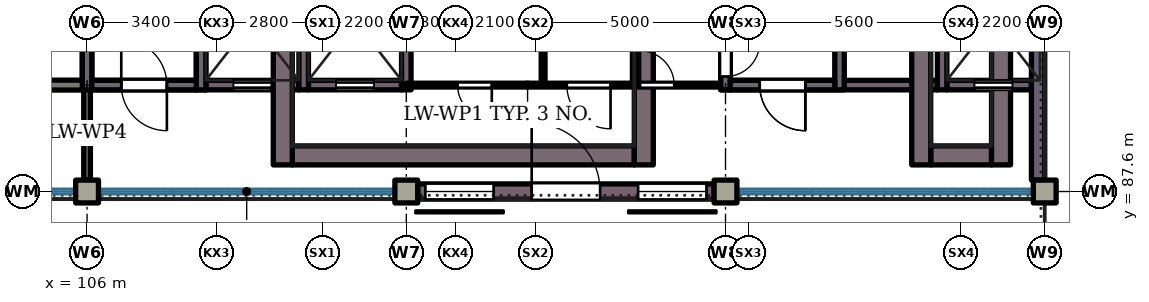
"""IFC4 building model, lengths in metres.
Left out: names, types, materials, properties, quantities, classifications, styles, units other than length and angle.
Written with IfcOpenShell. Run it as: python <this file> out.ifc"""

import sys

from ifc_helpers import new_model, si_unit, direction, frame, frame_2d, origin, origin_2d, place, context, subcontext, project, spatial, rectangle, extrude, element, fill, save


model = new_model("IFC4")
c1 = context("Model", 3, precision=1e-05, world=origin(), true_north=direction((0.0, 1.0)))
c2 = subcontext(c1, "Body", "Model", "MODEL_VIEW")
j1 = project(units=[si_unit("LENGTHUNIT", "METRE"), si_unit("PLANEANGLEUNIT", "RADIAN")], contexts=[c1])
p1 = place(None, origin())
s1 = spatial("IfcSite", under=j1, at=p1, CompositionType="ELEMENT")
p2 = place(p1, origin())
s2 = spatial("IfcBuilding", under=s1, at=p2, CompositionType="ELEMENT")
p3 = place(p2, frame((0.0, 0.0, 16.8)))
s3 = spatial("IfcBuildingStorey", under=s2, at=p3, CompositionType="ELEMENT", Elevation=16.8)
for number, where, z_axis, x_axis in (
    (1, (106.0, 87.6, 0.0), (0.0, 0.0, 1.0), (1.0, 0.0, 0.0)),
    (2, (114.4, 87.6, 0.0), (0.0, 0.0, 1.0), (1.0, 0.0, 0.0)),
    (3, (122.8, 87.6, 0.0), (0.0, 0.0, 1.0), (1.0, 0.0, 0.0)),
    (4, (131.2, 87.6, 0.0), (0.0, 0.0, 1.0), (1.0, 0.0, 0.0)),
):
    element("IfcColumn", number, at=place(p3, frame(where, z_axis=z_axis, x_axis=x_axis)), inside=s3, PredefinedType="COLUMN", context=c2, shape_type="SweptSolid", body=[
        extrude(rectangle(XDim=0.6, YDim=0.6, at=origin_2d()), origin(), (0.0, 0.0, 1.0), 4.2),
    ])
p4 = place(p3, frame((106.125, 90.4, 0.0), z_axis=(0.0, 0.0, 1.0), x_axis=(1.0, 0.0, 0.0)))
e5 = element("IfcWall", 5, at=p4, inside=s3, PredefinedType="SHEAR", context=c2, shape_type="SweptSolid", body=[
    extrude(rectangle(XDim=2.75, YDim=0.25, at=frame_2d((1.375, 0.0))), origin(), (0.0, 0.0, 1.0), 4.2),
])
p5 = place(p4, frame((0.775, 0.0, 0.0)))
e6 = element("IfcOpeningElement", 6, at=p5, cuts=e5, PredefinedType="OPENING", context=c2, shape_type="SweptSolid", body=[
    extrude(rectangle(XDim=1.2, YDim=2.1, at=frame_2d((0.6, 1.05))), frame((0.0, 0.135, 0.0), z_axis=(0.0, -1.0, 0.0), x_axis=(1.0, 0.0, 0.0)), (0.0, 0.0, 1.0), 0.27),
])
p6 = place(p3, frame((109.125, 90.4, 0.0), z_axis=(0.0, 0.0, 1.0), x_axis=(1.0, 0.0, 0.0)))
e7 = element("IfcWall", 7, at=p6, inside=s3, PredefinedType="SHEAR", context=c2, shape_type="SweptSolid", body=[
    extrude(rectangle(XDim=2.45, YDim=0.25, at=frame_2d((1.225, 0.0))), origin(), (0.0, 0.0, 1.0), 4.2),
])
p7 = place(p6, frame((0.725, 0.0, 0.0)))
e8 = element("IfcOpeningElement", 8, at=p7, cuts=e7, PredefinedType="OPENING", context=c2, shape_type="SweptSolid", body=[
    extrude(rectangle(XDim=1.0, YDim=2.1, at=frame_2d((0.5, 1.05))), frame((0.0, 0.135, 0.0), z_axis=(0.0, -1.0, 0.0), x_axis=(1.0, 0.0, 0.0)), (0.0, 0.0, 1.0), 0.27),
])
p8 = place(p3, frame((111.825, 90.4, 0.0), z_axis=(0.0, 0.0, 1.0), x_axis=(1.0, 0.0, 0.0)))
e9 = element("IfcWall", 9, at=p8, inside=s3, PredefinedType="SHEAR", context=c2, shape_type="SweptSolid", body=[
    extrude(rectangle(XDim=2.45, YDim=0.25, at=frame_2d((1.225, 0.0))), origin(), (0.0, 0.0, 1.0), 4.2),
])
p9 = place(p8, frame((0.725, 0.0, 0.0)))
e10 = element("IfcOpeningElement", 10, at=p9, cuts=e9, PredefinedType="OPENING", context=c2, shape_type="SweptSolid", body=[
    extrude(rectangle(XDim=1.0, YDim=2.1, at=frame_2d((0.5, 1.05))), frame((0.0, 0.135, 0.0), z_axis=(0.0, -1.0, 0.0), x_axis=(1.0, 0.0, 0.0)), (0.0, 0.0, 1.0), 0.27),
])
p10 = place(p3, frame((122.925, 90.4, 0.0), z_axis=(0.0, 0.0, 1.0), x_axis=(1.0, 0.0, 0.0)))
e11 = element("IfcWall", 11, at=p10, inside=s3, PredefinedType="SHEAR", context=c2, shape_type="SweptSolid", body=[
    extrude(rectangle(XDim=5.45, YDim=0.25, at=frame_2d((2.725, 0.0))), origin(), (0.0, 0.0, 1.0), 4.2),
])
p11 = place(p10, frame((0.775, 0.0, 0.0)))
e12 = element("IfcOpeningElement", 12, at=p11, cuts=e11, PredefinedType="OPENING", context=c2, shape_type="SweptSolid", body=[
    extrude(rectangle(XDim=1.2, YDim=2.1, at=frame_2d((0.6, 1.05))), frame((0.0, 0.135, 0.0), z_axis=(0.0, -1.0, 0.0), x_axis=(1.0, 0.0, 0.0)), (0.0, 0.0, 1.0), 0.27),
])
p12 = place(p3, frame((128.625, 90.4, 0.0), z_axis=(0.0, 0.0, 1.0), x_axis=(1.0, 0.0, 0.0)))
e13 = element("IfcWall", 13, at=p12, inside=s3, PredefinedType="SHEAR", context=c2, shape_type="SweptSolid", body=[
    extrude(rectangle(XDim=2.225, YDim=0.25, at=frame_2d((1.113, 0.0))), origin(), (0.0, 0.0, 1.0), 4.2),
])
p13 = place(p12, frame((0.725, 0.0, 0.0)))
e14 = element("IfcOpeningElement", 14, at=p13, cuts=e13, PredefinedType="OPENING", context=c2, shape_type="SweptSolid", body=[
    extrude(rectangle(XDim=1.0, YDim=2.1, at=frame_2d((0.5, 1.05))), frame((0.0, 0.135, 0.0), z_axis=(0.0, -1.0, 0.0), x_axis=(1.0, 0.0, 0.0)), (0.0, 0.0, 1.0), 0.27),
])
p14 = place(p3, frame((106.0, 90.275, 0.0), z_axis=(0.0, 0.0, 1.0), x_axis=(0.0, 1.0, 0.0)))
e15 = element("IfcWall", 15, at=p14, inside=s3, PredefinedType="SHEAR", context=c2, shape_type="SweptSolid", body=[
    extrude(rectangle(XDim=7.225, YDim=0.25, at=frame_2d((3.613, 0.0))), origin(), (0.0, 0.0, 1.0), 4.2),
])
for number, where, z_axis, x_axis in (
    (16, (109.0, 90.275, 0.0), (0.0, 0.0, 1.0), (0.0, 1.0, 0.0)),
    (17, (111.7, 90.275, 0.0), (0.0, 0.0, 1.0), (0.0, 1.0, 0.0)),
):
    element("IfcWall", number, at=place(p3, frame(where, z_axis=z_axis, x_axis=x_axis)), inside=s3, PredefinedType="SHEAR", context=c2, shape_type="SweptSolid", body=[
        extrude(rectangle(XDim=3.65, YDim=0.25, at=frame_2d((1.825, 0.0))), origin(), (0.0, 0.0, 1.0), 4.2),
    ])
p15 = place(p3, frame((114.4, 90.275, 0.0), z_axis=(0.0, 0.0, 1.0), x_axis=(0.0, 1.0, 0.0)))
e18 = element("IfcWall", 18, at=p15, inside=s3, PredefinedType="SHEAR", context=c2, shape_type="SweptSolid", body=[
    extrude(rectangle(XDim=7.225, YDim=0.25, at=frame_2d((3.613, 0.0))), origin(), (0.0, 0.0, 1.0), 4.2),
])
p16 = place(p15, frame((5.35, 0.0, 0.0)))
e19 = element("IfcOpeningElement", 19, at=p16, cuts=e18, PredefinedType="OPENING", context=c2, shape_type="SweptSolid", body=[
    extrude(rectangle(XDim=0.9, YDim=2.1, at=frame_2d((0.45, 1.05))), frame((0.0, 0.135, 0.0), z_axis=(0.0, -1.0, 0.0), x_axis=(1.0, 0.0, 0.0)), (0.0, 0.0, 1.0), 0.27),
])
p17 = place(p3, frame((122.8, 90.275, 0.0), z_axis=(0.0, 0.0, 1.0), x_axis=(0.0, 1.0, 0.0)))
e20 = element("IfcWall", 20, at=p17, inside=s3, PredefinedType="SHEAR", context=c2, shape_type="SweptSolid", body=[
    extrude(rectangle(XDim=7.225, YDim=0.25, at=frame_2d((3.613, 0.0))), origin(), (0.0, 0.0, 1.0), 4.2),
])
p18 = place(p17, frame((0.35, 0.0, 0.0)))
e21 = element("IfcOpeningElement", 21, at=p18, cuts=e20, PredefinedType="OPENING", context=c2, shape_type="SweptSolid", body=[
    extrude(rectangle(XDim=0.9, YDim=2.1, at=frame_2d((0.45, 1.05))), frame((0.0, 0.135, 0.0), z_axis=(0.0, -1.0, 0.0), x_axis=(1.0, 0.0, 0.0)), (0.0, 0.0, 1.0), 0.27),
])
p19 = place(p3, frame((128.5, 90.275, 0.0), z_axis=(0.0, 0.0, 1.0), x_axis=(0.0, 1.0, 0.0)))
e22 = element("IfcWall", 22, at=p19, inside=s3, PredefinedType="SHEAR", context=c2, shape_type="SweptSolid", body=[
    extrude(rectangle(XDim=3.65, YDim=0.25, at=frame_2d((1.825, 0.0))), origin(), (0.0, 0.0, 1.0), 4.2),
])
p20 = place(p3, frame((131.025, 97.5, 0.0), z_axis=(0.0, 0.0, 1.0), x_axis=(0.0, -1.0, 0.0)))
e23 = element("IfcWall", 23, at=p20, inside=s3, PredefinedType="SHEAR", context=c2, shape_type="SweptSolid", body=[
    extrude(rectangle(XDim=9.6, YDim=0.35, at=frame_2d((4.8, 0.0))), origin(), (0.0, 0.0, 1.0), 4.2),
])
p21 = place(p3, frame((114.7, 87.6, 0.0), z_axis=(0.0, 0.0, 1.0), x_axis=(1.0, 0.0, 0.0)))
e24 = element("IfcWall", 24, at=p21, inside=s3, PredefinedType="SOLIDWALL", context=c2, shape_type="SweptSolid", body=[
    extrude(rectangle(XDim=7.8, YDim=0.4, at=frame_2d((3.9, 0.0))), origin(), (0.0, 0.0, 1.0), 3.3),
])
p22 = place(p21, frame((3.0, 0.0, 0.0)))
e25 = element("IfcOpeningElement", 25, at=p22, cuts=e24, PredefinedType="OPENING", context=c2, shape_type="SweptSolid", body=[
    extrude(rectangle(XDim=1.8, YDim=2.4, at=frame_2d((0.9, 1.2))), frame((0.0, 0.21, 0.0), z_axis=(0.0, -1.0, 0.0), x_axis=(1.0, 0.0, 0.0)), (0.0, 0.0, 1.0), 0.42),
])
p23 = place(p21, frame((0.2, 0.0, 0.9)))
e26 = element("IfcOpeningElement", 26, at=p23, cuts=e24, PredefinedType="OPENING", context=c2, shape_type="SweptSolid", body=[
    extrude(rectangle(XDim=1.8, YDim=1.9, at=frame_2d((0.9, 0.95))), frame((0.0, 0.21, 0.0), z_axis=(0.0, -1.0, 0.0), x_axis=(1.0, 0.0, 0.0)), (0.0, 0.0, 1.0), 0.42),
])
p24 = place(p21, frame((5.8, 0.0, 0.9)))
e27 = element("IfcOpeningElement", 27, at=p24, cuts=e24, PredefinedType="OPENING", context=c2, shape_type="SweptSolid", body=[
    extrude(rectangle(XDim=1.8, YDim=1.9, at=frame_2d((0.9, 0.95))), frame((0.0, 0.21, 0.0), z_axis=(0.0, -1.0, 0.0), x_axis=(1.0, 0.0, 0.0)), (0.0, 0.0, 1.0), 0.42),
])
p25 = place(p3, frame((128.2, 88.55, 4.2), z_axis=(0.0, 0.0, 1.0), x_axis=(1.0, 0.0, 0.0)))
e28 = element("IfcWall", 28, at=p25, inside=s3, PredefinedType="SOLIDWALL", context=c2, shape_type="SweptSolid", body=[
    extrude(rectangle(XDim=1.6, YDim=0.5, at=frame_2d((0.8, 0.0))), origin(), (0.0, 0.0, 1.0), 0.9),
])
for number, where, z_axis, x_axis in (
    (29, (127.95, 88.3, 4.2), (0.0, 0.0, 1.0), (0.0, 1.0, 0.0)),
    (30, (130.05, 88.3, 4.2), (0.0, 0.0, 1.0), (0.0, 1.0, 0.0)),
):
    element("IfcWall", number, at=place(p3, frame(where, z_axis=z_axis, x_axis=x_axis)), inside=s3, PredefinedType="SOLIDWALL", context=c2, shape_type="SweptSolid", body=[
        extrude(rectangle(XDim=8.8, YDim=0.5, at=frame_2d((4.4, 0.0))), origin(), (0.0, 0.0, 1.0), 0.9),
    ])
p26 = place(p3, frame((111.4, 88.55, 4.2), z_axis=(0.0, 0.0, 1.0), x_axis=(1.0, 0.0, 0.0)))
e31 = element("IfcWall", 31, at=p26, inside=s3, PredefinedType="SOLIDWALL", context=c2, shape_type="SweptSolid", body=[
    extrude(rectangle(XDim=9.0, YDim=0.5, at=frame_2d((4.5, 0.0))), origin(), (0.0, 0.0, 1.0), 0.9),
])
for number, where, z_axis, x_axis in (
    (32, (111.15, 88.3, 4.2), (0.0, 0.0, 1.0), (0.0, 1.0, 0.0)),
    (33, (120.65, 88.3, 4.2), (0.0, 0.0, 1.0), (0.0, 1.0, 0.0)),
):
    element("IfcWall", number, at=place(p3, frame(where, z_axis=z_axis, x_axis=x_axis)), inside=s3, PredefinedType="SOLIDWALL", context=c2, shape_type="SweptSolid", body=[
        extrude(rectangle(XDim=8.8, YDim=0.5, at=frame_2d((4.4, 0.0))), origin(), (0.0, 0.0, 1.0), 0.9),
    ])
p27 = place(p3, frame((97.6, 90.4, 0.0), z_axis=(0.0, 0.0, 1.0), x_axis=(1.0, 0.0, 0.0)))
e34 = element("IfcWall", 34, at=p27, inside=s3, PredefinedType="PARTITIONING", context=c2, shape_type="SweptSolid", body=[
    extrude(rectangle(XDim=8.4, YDim=0.26, at=frame_2d((4.2, 0.0))), origin(), (0.0, 0.0, 1.0), 3.9),
])
p28 = place(p27, frame((3.45, 0.0, 0.0)))
e35 = element("IfcOpeningElement", 35, at=p28, cuts=e34, PredefinedType="OPENING", context=c2, shape_type="SweptSolid", body=[
    extrude(rectangle(XDim=1.5, YDim=2.1, at=frame_2d((0.75, 1.05))), frame((0.0, 0.14, 0.0), z_axis=(0.0, -1.0, 0.0), x_axis=(1.0, 0.0, 0.0)), (0.0, 0.0, 1.0), 0.28),
])
p29 = place(p3, frame((114.4, 90.4, 0.0), z_axis=(0.0, 0.0, 1.0), x_axis=(1.0, 0.0, 0.0)))
e36 = element("IfcWall", 36, at=p29, inside=s3, PredefinedType="PARTITIONING", context=c2, shape_type="SweptSolid", body=[
    extrude(rectangle(XDim=8.4, YDim=0.1, at=frame_2d((4.2, 0.0))), origin(), (0.0, 0.0, 1.0), 3.9),
])
p30 = place(p29, frame((1.35, 0.0, 0.0)))
e37 = element("IfcOpeningElement", 37, at=p30, cuts=e36, PredefinedType="OPENING", context=c2, shape_type="SweptSolid", body=[
    extrude(rectangle(XDim=0.9, YDim=2.1, at=frame_2d((0.45, 1.05))), frame((0.0, 0.06, 0.0), z_axis=(0.0, -1.0, 0.0), x_axis=(1.0, 0.0, 0.0)), (0.0, 0.0, 1.0), 0.12),
])
p31 = place(p29, frame((4.225, 0.0, 0.0)))
e38 = element("IfcOpeningElement", 38, at=p31, cuts=e36, PredefinedType="OPENING", context=c2, shape_type="SweptSolid", body=[
    extrude(rectangle(XDim=1.15, YDim=2.1, at=frame_2d((0.575, 1.05))), frame((0.0, 0.06, 0.0), z_axis=(0.0, -1.0, 0.0), x_axis=(1.0, 0.0, 0.0)), (0.0, 0.0, 1.0), 0.12),
])
p32 = place(p29, frame((6.15, 0.0, 0.0)))
e39 = element("IfcOpeningElement", 39, at=p32, cuts=e36, PredefinedType="OPENING", context=c2, shape_type="SweptSolid", body=[
    extrude(rectangle(XDim=0.9, YDim=2.1, at=frame_2d((0.45, 1.05))), frame((0.0, 0.06, 0.0), z_axis=(0.0, -1.0, 0.0), x_axis=(1.0, 0.0, 0.0)), (0.0, 0.0, 1.0), 0.12),
])
p33 = place(p3, frame((106.0, 87.9, 0.0), z_axis=(0.0, 0.0, 1.0), x_axis=(0.0, 1.0, 0.0)))
e40 = element("IfcWall", 40, at=p33, inside=s3, PredefinedType="PARTITIONING", context=c2, shape_type="SweptSolid", body=[
    extrude(rectangle(XDim=2.5, YDim=0.175, at=frame_2d((1.25, 0.0))), origin(), (0.0, 0.0, 1.0), 3.0),
])
for number, where, z_axis, x_axis in (
    (41, (118.0, 90.4, 0.0), (0.0, 0.0, 1.0), (0.0, 1.0, 0.0)),
    (42, (120.4, 90.4, 0.0), (0.0, 0.0, 1.0), (0.0, 1.0, 0.0)),
):
    element("IfcWall", number, at=place(p3, frame(where, z_axis=z_axis, x_axis=x_axis)), inside=s3, PredefinedType="PARTITIONING", context=c2, shape_type="SweptSolid", body=[
        extrude(rectangle(XDim=7.2, YDim=0.1, at=frame_2d((3.6, 0.0))), origin(), (0.0, 0.0, 1.0), 3.9),
    ])
for number, where, z_axis, x_axis in (
    (43, (106.0, 90.275, 4.2), (0.0, 0.0, 1.0), (0.0, 1.0, 0.0)),
    (44, (109.0, 90.275, 4.2), (0.0, 0.0, 1.0), (0.0, 1.0, 0.0)),
):
    element("IfcWall", number, at=place(p3, frame(where, z_axis=z_axis, x_axis=x_axis)), inside=s3, PredefinedType="SHEAR", context=c2, shape_type="SweptSolid", body=[
        extrude(rectangle(XDim=7.525, YDim=0.25, at=frame_2d((3.763, 0.0))), origin(), (0.0, 0.0, 1.0), 3.5),
    ])
p34 = place(p3, frame((106.125, 90.4, 4.2), z_axis=(0.0, 0.0, 1.0), x_axis=(1.0, 0.0, 0.0)))
e45 = element("IfcWall", 45, at=p34, inside=s3, PredefinedType="SHEAR", context=c2, shape_type="SweptSolid", body=[
    extrude(rectangle(XDim=2.75, YDim=0.25, at=frame_2d((1.375, 0.0))), origin(), (0.0, 0.0, 1.0), 3.5),
])
p35 = place(p34, frame((0.775, 0.0, 0.0)))
e46 = element("IfcOpeningElement", 46, at=p35, cuts=e45, PredefinedType="OPENING", context=c2, shape_type="SweptSolid", body=[
    extrude(rectangle(XDim=1.2, YDim=2.1, at=frame_2d((0.6, 1.05))), frame((0.0, 0.135, 0.0), z_axis=(0.0, -1.0, 0.0), x_axis=(1.0, 0.0, 0.0)), (0.0, 0.0, 1.0), 0.27),
])
for number, where, z_axis, x_axis in (
    (47, (122.8, 90.275, 4.2), (0.0, 0.0, 1.0), (0.0, 1.0, 0.0)),
    (48, (125.8, 90.275, 4.2), (0.0, 0.0, 1.0), (0.0, 1.0, 0.0)),
):
    element("IfcWall", number, at=place(p3, frame(where, z_axis=z_axis, x_axis=x_axis)), inside=s3, PredefinedType="SHEAR", context=c2, shape_type="SweptSolid", body=[
        extrude(rectangle(XDim=7.525, YDim=0.25, at=frame_2d((3.763, 0.0))), origin(), (0.0, 0.0, 1.0), 4.2),
    ])
p36 = place(p3, frame((122.925, 90.4, 4.2), z_axis=(0.0, 0.0, 1.0), x_axis=(1.0, 0.0, 0.0)))
e49 = element("IfcWall", 49, at=p36, inside=s3, PredefinedType="SHEAR", context=c2, shape_type="SweptSolid", body=[
    extrude(rectangle(XDim=2.75, YDim=0.25, at=frame_2d((1.375, 0.0))), origin(), (0.0, 0.0, 1.0), 4.2),
])
p37 = place(p36, frame((0.775, 0.0, 0.0)))
e50 = element("IfcOpeningElement", 50, at=p37, cuts=e49, PredefinedType="OPENING", context=c2, shape_type="SweptSolid", body=[
    extrude(rectangle(XDim=1.2, YDim=2.1, at=frame_2d((0.6, 1.05))), frame((0.0, 0.135, 0.0), z_axis=(0.0, -1.0, 0.0), x_axis=(1.0, 0.0, 0.0)), (0.0, 0.0, 1.0), 0.27),
])
p38 = place(p22, origin())
e51 = element("IfcDoor", 51, at=p38, inside=s3, OperationType="DOUBLE_DOOR_SINGLE_SWING", PredefinedType="DOOR", context=c2, shape_type="SweptSolid", body=[
    extrude(rectangle(XDim=1.8, YDim=2.4, at=frame_2d((0.9, 1.2))), frame((0.0, 0.025, 0.0), z_axis=(0.0, -1.0, 0.0), x_axis=(1.0, 0.0, 0.0)), (0.0, 0.0, 1.0), 0.05),
])
fill(e25, e51)
p39 = place(p23, origin())
e52 = element("IfcWindow", 52, at=p39, inside=s3, PartitioningType="SINGLE_PANEL", PredefinedType="WINDOW", context=c2, shape_type="SweptSolid", body=[
    extrude(rectangle(XDim=1.8, YDim=1.9, at=frame_2d((0.9, 0.95))), frame((0.0, 0.03, 0.0), z_axis=(0.0, -1.0, 0.0), x_axis=(1.0, 0.0, 0.0)), (0.0, 0.0, 1.0), 0.06),
])
fill(e26, e52)
p40 = place(p24, origin())
e53 = element("IfcWindow", 53, at=p40, inside=s3, PartitioningType="SINGLE_PANEL", PredefinedType="WINDOW", context=c2, shape_type="SweptSolid", body=[
    extrude(rectangle(XDim=1.8, YDim=1.9, at=frame_2d((0.9, 0.95))), frame((0.0, 0.03, 0.0), z_axis=(0.0, -1.0, 0.0), x_axis=(1.0, 0.0, 0.0)), (0.0, 0.0, 1.0), 0.06),
])
fill(e27, e53)
p41 = place(p30, origin())
e54 = element("IfcDoor", 54, at=p41, inside=s3, OperationType="SINGLE_SWING_RIGHT", PredefinedType="DOOR", context=c2, shape_type="SweptSolid", body=[
    extrude(rectangle(XDim=0.9, YDim=2.1, at=frame_2d((0.45, 1.05))), frame((0.0, 0.025, 0.0), z_axis=(0.0, -1.0, 0.0), x_axis=(1.0, 0.0, 0.0)), (0.0, 0.0, 1.0), 0.05),
])
fill(e37, e54)
p42 = place(p31, origin())
e55 = element("IfcDoor", 55, at=p42, inside=s3, OperationType="SINGLE_SWING_RIGHT", PredefinedType="DOOR", context=c2, shape_type="SweptSolid", body=[
    extrude(rectangle(XDim=1.15, YDim=2.1, at=frame_2d((0.575, 1.05))), frame((0.0, 0.025, 0.0), z_axis=(0.0, -1.0, 0.0), x_axis=(1.0, 0.0, 0.0)), (0.0, 0.0, 1.0), 0.05),
])
fill(e38, e55)
p43 = place(p32, origin())
e56 = element("IfcDoor", 56, at=p43, inside=s3, OperationType="SINGLE_SWING_LEFT", PredefinedType="DOOR", context=c2, shape_type="SweptSolid", body=[
    extrude(rectangle(XDim=0.9, YDim=2.1, at=frame_2d((0.45, 1.05))), frame((0.0, 0.025, 0.0), z_axis=(0.0, -1.0, 0.0), x_axis=(1.0, 0.0, 0.0)), (0.0, 0.0, 1.0), 0.05),
])
fill(e39, e56)
p44 = place(p18, origin())
e57 = element("IfcDoor", 57, at=p44, inside=s3, OperationType="SINGLE_SWING_RIGHT", PredefinedType="DOOR", context=c2, shape_type="SweptSolid", body=[
    extrude(rectangle(XDim=0.9, YDim=2.1, at=frame_2d((0.45, 1.05))), frame((0.0, 0.025, 0.0), z_axis=(0.0, -1.0, 0.0), x_axis=(1.0, 0.0, 0.0)), (0.0, 0.0, 1.0), 0.05),
])
fill(e21, e57)
p45 = place(p5, origin())
e58 = element("IfcDoor", 58, at=p45, inside=s3, OperationType="SINGLE_SWING_LEFT", PredefinedType="DOOR", context=c2, shape_type="SweptSolid", body=[
    extrude(rectangle(XDim=1.2, YDim=2.1, at=frame_2d((0.6, 1.05))), frame((0.0, 0.025, 0.0), z_axis=(0.0, -1.0, 0.0), x_axis=(1.0, 0.0, 0.0)), (0.0, 0.0, 1.0), 0.05),
])
fill(e6, e58)
p46 = place(p7, origin())
e59 = element("IfcDoor", 59, at=p46, inside=s3, OperationType="SLIDING_TO_LEFT", PredefinedType="DOOR", context=c2, shape_type="SweptSolid", body=[
    extrude(rectangle(XDim=1.0, YDim=2.1, at=frame_2d((0.5, 1.05))), frame((0.0, 0.025, 0.0), z_axis=(0.0, -1.0, 0.0), x_axis=(1.0, 0.0, 0.0)), (0.0, 0.0, 1.0), 0.05),
])
fill(e8, e59)
p47 = place(p9, origin())
e60 = element("IfcDoor", 60, at=p47, inside=s3, OperationType="SLIDING_TO_LEFT", PredefinedType="DOOR", context=c2, shape_type="SweptSolid", body=[
    extrude(rectangle(XDim=1.0, YDim=2.1, at=frame_2d((0.5, 1.05))), frame((0.0, 0.025, 0.0), z_axis=(0.0, -1.0, 0.0), x_axis=(1.0, 0.0, 0.0)), (0.0, 0.0, 1.0), 0.05),
])
fill(e10, e60)
p48 = place(p11, origin())
e61 = element("IfcDoor", 61, at=p48, inside=s3, OperationType="SINGLE_SWING_RIGHT", PredefinedType="DOOR", context=c2, shape_type="SweptSolid", body=[
    extrude(rectangle(XDim=1.2, YDim=2.1, at=frame_2d((0.6, 1.05))), frame((0.0, 0.025, 0.0), z_axis=(0.0, -1.0, 0.0), x_axis=(1.0, 0.0, 0.0)), (0.0, 0.0, 1.0), 0.05),
])
fill(e12, e61)
p49 = place(p13, origin())
e62 = element("IfcDoor", 62, at=p49, inside=s3, OperationType="SLIDING_TO_LEFT", PredefinedType="DOOR", context=c2, shape_type="SweptSolid", body=[
    extrude(rectangle(XDim=1.0, YDim=2.1, at=frame_2d((0.5, 1.05))), frame((0.0, 0.025, 0.0), z_axis=(0.0, -1.0, 0.0), x_axis=(1.0, 0.0, 0.0)), (0.0, 0.0, 1.0), 0.05),
])
fill(e14, e62)
p50 = place(p35, origin())
e63 = element("IfcDoor", 63, at=p50, inside=s3, OperationType="SINGLE_SWING_RIGHT", PredefinedType="DOOR", context=c2, shape_type="SweptSolid", body=[
    extrude(rectangle(XDim=1.2, YDim=2.1, at=frame_2d((0.6, 1.05))), frame((0.0, 0.025, 0.0), z_axis=(0.0, -1.0, 0.0), x_axis=(1.0, 0.0, 0.0)), (0.0, 0.0, 1.0), 0.05),
])
fill(e46, e63)
p51 = place(p37, origin())
e64 = element("IfcDoor", 64, at=p51, inside=s3, OperationType="SINGLE_SWING_RIGHT", PredefinedType="DOOR", context=c2, shape_type="SweptSolid", body=[
    extrude(rectangle(XDim=1.2, YDim=2.1, at=frame_2d((0.6, 1.05))), frame((0.0, 0.025, 0.0), z_axis=(0.0, -1.0, 0.0), x_axis=(1.0, 0.0, 0.0)), (0.0, 0.0, 1.0), 0.05),
])
fill(e50, e64)
save(model, sys.argv[1])
